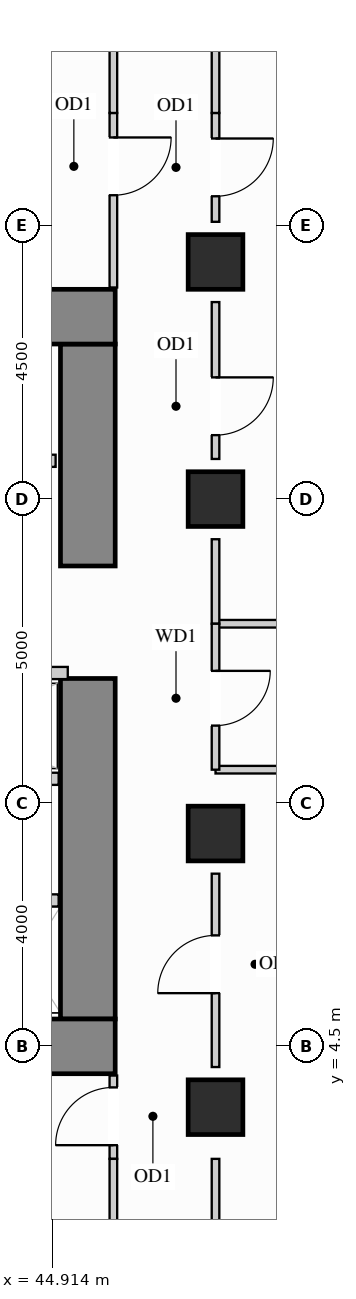
"""IFC4 building model, lengths in metres.
Left out: names, types, materials, properties, quantities, classifications, styles, units other than length and angle.
Written with IfcOpenShell. Run it as: python <this file> out.ifc"""

import sys

from ifc_helpers import new_model, si_unit, direction, frame, frame_2d, origin, origin_2d, place, context, subcontext, project, spatial, rectangle, extrude, source, transform, mapped, element, fill, save


model = new_model("IFC4")
c1 = context("Model", 3, precision=1e-05, world=origin(), true_north=direction((0.0, 1.0)))
c2 = subcontext(c1, "Body", "Model", "MODEL_VIEW")
j1 = project(units=[si_unit("LENGTHUNIT", "METRE"), si_unit("PLANEANGLEUNIT", "RADIAN")], contexts=[c1])
p1 = place(None, origin())
s1 = spatial("IfcSite", under=j1, at=p1, CompositionType="ELEMENT")
p2 = place(p1, origin())
s2 = spatial("IfcBuilding", under=s1, at=p2, CompositionType="ELEMENT")
p3 = place(p2, frame((0.0, 0.0, 51.3)))
s3 = spatial("IfcBuildingStorey", under=s2, at=p3, CompositionType="ELEMENT", Elevation=51.3)
m1 = source(origin(), c2, "Body", "SweptSolid", [
    extrude(rectangle(XDim=0.9, YDim=0.9, at=origin_2d()), origin(), (0.0, 0.0, 1.0), 3.38),
])
for number, where, z_axis, x_axis in (
    (1, (47.6, 13.5, 0.0), (0.0, 0.0, 1.0), (1.0, 0.0, 0.0)),
    (2, (47.6, 3.5, 0.0), (0.0, 0.0, 1.0), (1.0, 0.0, 0.0)),
    (3, (47.6, 8.0, 0.0), (0.0, 0.0, 1.0), (1.0, 0.0, 0.0)),
    (4, (47.6, 17.4, 0.0), (0.0, 0.0, 1.0), (1.0, 0.0, 0.0)),
):
    element("IfcColumn", number, at=place(p3, frame(where, z_axis=z_axis, x_axis=x_axis)), inside=s3, PredefinedType="COLUMN", context=c2, shape_type="MappedRepresentation", body=[
        mapped(m1, transform((0.0, 0.0, 0.0), x_axis=(1.0, 0.0, 0.0), y_axis=(0.0, 1.0, 0.0), z_axis=(0.0, 0.0, 1.0))),
    ])
m2 = source(origin(), c2, "Body", "SweptSolid", [
    extrude(rectangle(XDim=5.6, YDim=0.9, at=frame_2d((2.8, 0.0))), origin(), (0.0, 0.0, 1.0), 3.38),
])
p4 = place(p3, frame((45.5, 4.95, 0.0), z_axis=(0.0, 0.0, 1.0), x_axis=(0.0, 1.0, 0.0)))
e5 = element("IfcWall", 5, at=p4, inside=s3, PredefinedType="SHEAR", context=c2, shape_type="MappedRepresentation", body=[
    mapped(m2, transform((0.0, 0.0, 0.0), x_axis=(1.0, 0.0, 0.0), y_axis=(0.0, 1.0, 0.0), z_axis=(0.0, 0.0, 1.0))),
])
m3 = source(origin(), c2, "Body", "SweptSolid", [
    extrude(rectangle(XDim=3.65, YDim=0.9, at=frame_2d((1.825, 0.0))), origin(), (0.0, 0.0, 1.0), 3.38),
])
p5 = place(p3, frame((45.5, 12.4, 0.0), z_axis=(0.0, 0.0, 1.0), x_axis=(0.0, 1.0, 0.0)))
e6 = element("IfcWall", 6, at=p5, inside=s3, PredefinedType="SHEAR", context=c2, shape_type="MappedRepresentation", body=[
    mapped(m3, transform((0.0, 0.0, 0.0), x_axis=(1.0, 0.0, 0.0), y_axis=(0.0, 1.0, 0.0), z_axis=(0.0, 0.0, 1.0))),
])
m4 = source(origin(), c2, "Body", "SweptSolid", [
    extrude(rectangle(XDim=10.4, YDim=0.9, at=frame_2d((5.2, 0.0))), origin(), (0.0, 0.0, 1.0), 3.38),
])
for number, where, z_axis, x_axis in (
    (7, (35.55, 16.5, 0.0), (0.0, 0.0, 1.0), (1.0, 0.0, 0.0)),
    (8, (35.55, 4.5, 0.0), (0.0, 0.0, 1.0), (1.0, 0.0, 0.0)),
):
    element("IfcWall", number, at=place(p3, frame(where, z_axis=z_axis, x_axis=x_axis)), inside=s3, PredefinedType="SHEAR", context=c2, shape_type="MappedRepresentation", body=[
        mapped(m4, transform((0.0, 0.0, 0.0), x_axis=(1.0, 0.0, 0.0), y_axis=(0.0, 1.0, 0.0), z_axis=(0.0, 0.0, 1.0))),
    ])
m5 = source(origin(), c2, "Body", "SweptSolid", [
    extrude(rectangle(XDim=11.048, YDim=0.125, at=frame_2d((5.524, 0.0))), origin(), (0.0, 0.0, 1.0), 3.365),
])
for number, where, z_axis, x_axis in (
    (9, (47.6, 11.45, 0.0), (0.0, 0.0, 1.0), (1.0, 0.0, 0.0)),
    (10, (47.6, 9.05, 0.0), (0.0, 0.0, 1.0), (1.0, 0.0, 0.0)),
):
    element("IfcWall", number, at=place(p3, frame(where, z_axis=z_axis, x_axis=x_axis)), inside=s3, PredefinedType="PARTITIONING", context=c2, shape_type="MappedRepresentation", body=[
        mapped(m5, transform((0.0, 0.0, 0.0), x_axis=(1.0, 0.0, 0.0), y_axis=(0.0, 1.0, 0.0), z_axis=(0.0, 0.0, 1.0))),
    ])
p6 = place(p3, frame((47.6, 4.16, 0.0), z_axis=(0.0, 0.0, 1.0), x_axis=(0.0, 1.0, 0.0)))
e11 = element("IfcWall", 11, at=p6, inside=s3, PredefinedType="PARTITIONING", context=c2, shape_type="SweptSolid", body=[
    extrude(rectangle(XDim=3.18, YDim=0.125, at=frame_2d((1.59, 0.0))), origin(), (0.0, 0.0, 1.0), 2.67),
])
p7 = place(p6, frame((1.215, 0.0, 0.0)))
e12 = element("IfcOpeningElement", 12, at=p7, cuts=e11, PredefinedType="OPENING", context=c2, shape_type="SweptSolid", body=[
    extrude(rectangle(XDim=0.95, YDim=2.15, at=frame_2d((0.475, 1.075))), frame((0.0, 0.073, 0.0), z_axis=(0.0, -1.0, 0.0), x_axis=(1.0, 0.0, 0.0)), (0.0, 0.0, 1.0), 0.145),
])
m6 = source(origin(), c2, "Body", "SweptSolid", [
    extrude(rectangle(XDim=1.39, YDim=0.125, at=frame_2d((0.695, 0.0))), origin(), (0.0, 0.0, 1.0), 2.67),
])
p8 = place(p3, frame((47.6, 1.26, 0.0), z_axis=(0.0, 0.0, 1.0), x_axis=(0.0, 1.0, 0.0)))
e13 = element("IfcWall", 13, at=p8, inside=s3, PredefinedType="PARTITIONING", context=c2, shape_type="MappedRepresentation", body=[
    mapped(m6, transform((0.0, 0.0, 0.0), x_axis=(1.0, 0.0, 0.0), y_axis=(0.0, 1.0, 0.0), z_axis=(0.0, 0.0, 1.0))),
])
m7 = source(origin(), c2, "Body", "SweptSolid", [
    extrude(rectangle(XDim=1.39, YDim=0.125, at=frame_2d((0.695, 0.0))), origin(), (0.0, 0.0, 1.0), 2.67),
])
p9 = place(p3, frame((47.6, 11.45, 0.0), z_axis=(0.0, 0.0, 1.0), x_axis=(0.0, 1.0, 0.0)))
e14 = element("IfcWall", 14, at=p9, inside=s3, PredefinedType="PARTITIONING", context=c2, shape_type="MappedRepresentation", body=[
    mapped(m7, transform((0.0, 0.0, 0.0), x_axis=(1.0, 0.0, 0.0), y_axis=(0.0, 1.0, 0.0), z_axis=(0.0, 0.0, 1.0))),
])
p10 = place(p3, frame((47.6, 14.16, 0.0), z_axis=(0.0, 0.0, 1.0), x_axis=(0.0, 1.0, 0.0)))
e15 = element("IfcWall", 15, at=p10, inside=s3, PredefinedType="PARTITIONING", context=c2, shape_type="SweptSolid", body=[
    extrude(rectangle(XDim=2.58, YDim=0.125, at=frame_2d((1.29, 0.0))), origin(), (0.0, 0.0, 1.0), 2.67),
])
p11 = place(p10, frame((0.392, 0.0, 0.0)))
e16 = element("IfcOpeningElement", 16, at=p11, cuts=e15, PredefinedType="OPENING", context=c2, shape_type="SweptSolid", body=[
    extrude(rectangle(XDim=0.95, YDim=2.15, at=frame_2d((0.475, 1.075))), frame((0.0, 0.073, 0.0), z_axis=(0.0, -1.0, 0.0), x_axis=(1.0, 0.0, 0.0)), (0.0, 0.0, 1.0), 0.145),
])
p12 = place(p3, frame((47.6, 18.06, 0.0), z_axis=(0.0, 0.0, 1.0), x_axis=(0.0, 1.0, 0.0)))
e17 = element("IfcWall", 17, at=p12, inside=s3, PredefinedType="PARTITIONING", context=c2, shape_type="SweptSolid", body=[
    extrude(rectangle(XDim=1.79, YDim=0.125, at=frame_2d((0.895, 0.0))), origin(), (0.0, 0.0, 1.0), 2.67),
])
p13 = place(p12, frame((0.42, 0.0, 0.0)))
e18 = element("IfcOpeningElement", 18, at=p13, cuts=e17, PredefinedType="OPENING", context=c2, shape_type="SweptSolid", body=[
    extrude(rectangle(XDim=0.95, YDim=2.15, at=frame_2d((0.475, 1.075))), frame((0.0, 0.073, 0.0), z_axis=(0.0, -1.0, 0.0), x_axis=(1.0, 0.0, 0.0)), (0.0, 0.0, 1.0), 0.145),
])
p14 = place(p3, frame((47.6, 19.85, 0.0), z_axis=(0.0, 0.0, 1.0), x_axis=(0.0, 1.0, 0.0)))
e19 = element("IfcWall", 19, at=p14, inside=s3, PredefinedType="PARTITIONING", context=c2, shape_type="MappedRepresentation", body=[
    mapped(m6, transform((0.0, 0.0, 0.0), x_axis=(1.0, 0.0, 0.0), y_axis=(0.0, 1.0, 0.0), z_axis=(0.0, 0.0, 1.0))),
])
p15 = place(p3, frame((47.6, 9.05, 0.0), z_axis=(0.0, 0.0, 1.0), x_axis=(0.0, 1.0, 0.0)))
e20 = element("IfcWall", 20, at=p15, inside=s3, PredefinedType="PARTITIONING", context=c2, shape_type="SweptSolid", body=[
    extrude(rectangle(XDim=2.4, YDim=0.125, at=frame_2d((1.2, 0.0))), origin(), (0.0, 0.0, 1.0), 2.67),
])
p16 = place(p15, frame((0.725, 0.0, 0.0)))
e21 = element("IfcOpeningElement", 21, at=p16, cuts=e20, PredefinedType="OPENING", context=c2, shape_type="SweptSolid", body=[
    extrude(rectangle(XDim=0.9, YDim=2.15, at=frame_2d((0.45, 1.075))), frame((0.0, 0.073, 0.0), z_axis=(0.0, -1.0, 0.0), x_axis=(1.0, 0.0, 0.0)), (0.0, 0.0, 1.0), 0.145),
])
p17 = place(p3, frame((45.92, 16.98, 0.0), z_axis=(0.0, 0.0, 1.0), x_axis=(0.0, 1.0, 0.0)))
e22 = element("IfcWall", 22, at=p17, inside=s3, PredefinedType="PARTITIONING", context=c2, shape_type="SweptSolid", body=[
    extrude(rectangle(XDim=2.87, YDim=0.125, at=frame_2d((1.435, 0.0))), origin(), (0.0, 0.0, 1.0), 3.365),
])
p18 = place(p17, frame((1.517, 0.0, 0.0)))
e23 = element("IfcOpeningElement", 23, at=p18, cuts=e22, PredefinedType="OPENING", context=c2, shape_type="SweptSolid", body=[
    extrude(rectangle(XDim=0.95, YDim=2.15, at=frame_2d((0.475, 1.075))), frame((0.0, 0.073, 0.0), z_axis=(0.0, -1.0, 0.0), x_axis=(1.0, 0.0, 0.0)), (0.0, 0.0, 1.0), 0.145),
])
m8 = source(origin(), c2, "Body", "SweptSolid", [
    extrude(rectangle(XDim=2.298, YDim=0.125, at=frame_2d((1.149, 0.0))), origin(), (0.0, 0.0, 1.0), 3.365),
])
p19 = place(p3, frame((45.92, 19.85, 0.0), z_axis=(0.0, 0.0, 1.0), x_axis=(0.0, 1.0, 0.0)))
e24 = element("IfcWall", 24, at=p19, inside=s3, PredefinedType="PARTITIONING", context=c2, shape_type="MappedRepresentation", body=[
    mapped(m8, transform((0.0, 0.0, 0.0), x_axis=(1.0, 0.0, 0.0), y_axis=(0.0, 1.0, 0.0), z_axis=(0.0, 0.0, 1.0))),
])
p20 = place(p3, frame((45.92, 2.65, 0.0), z_axis=(0.0, 0.0, 1.0), x_axis=(0.0, 1.0, 0.0)))
e25 = element("IfcWall", 25, at=p20, inside=s3, PredefinedType="PARTITIONING", context=c2, shape_type="SweptSolid", body=[
    extrude(rectangle(XDim=1.37, YDim=0.125, at=frame_2d((0.685, 0.0))), origin(), (0.0, 0.0, 1.0), 3.365),
])
p21 = place(p20, frame((0.225, 0.0, 0.0)))
e26 = element("IfcOpeningElement", 26, at=p21, cuts=e25, PredefinedType="OPENING", context=c2, shape_type="SweptSolid", body=[
    extrude(rectangle(XDim=0.95, YDim=2.15, at=frame_2d((0.475, 1.075))), frame((0.0, 0.073, 0.0), z_axis=(0.0, -1.0, 0.0), x_axis=(1.0, 0.0, 0.0)), (0.0, 0.0, 1.0), 0.145),
])
p22 = place(p3, frame((45.92, 0.352, 0.0), z_axis=(0.0, 0.0, 1.0), x_axis=(0.0, 1.0, 0.0)))
e27 = element("IfcWall", 27, at=p22, inside=s3, PredefinedType="PARTITIONING", context=c2, shape_type="MappedRepresentation", body=[
    mapped(m8, transform((0.0, 0.0, 0.0), x_axis=(1.0, 0.0, 0.0), y_axis=(0.0, 1.0, 0.0), z_axis=(0.0, 0.0, 1.0))),
])
m9 = source(origin(), c2, "Body", "SweptSolid", [
    extrude(rectangle(XDim=1.17, YDim=0.2, at=frame_2d((0.585, 0.0))), origin(), (0.0, 0.0, 1.0), 3.365),
])
p23 = place(p3, frame((43.85, 6.9, 0.0), z_axis=(0.0, 0.0, 1.0), x_axis=(1.0, 0.0, 0.0)))
e28 = element("IfcWall", 28, at=p23, inside=s3, PredefinedType="PARTITIONING", context=c2, shape_type="MappedRepresentation", body=[
    mapped(m9, transform((0.0, 0.0, 0.0), x_axis=(1.0, 0.0, 0.0), y_axis=(0.0, 1.0, 0.0), z_axis=(0.0, 0.0, 1.0))),
])
p24 = place(p3, frame((42.23, 14.13, 0.0), z_axis=(0.0, 0.0, 1.0), x_axis=(1.0, 0.0, 0.0)))
e29 = element("IfcWall", 29, at=p24, inside=s3, PredefinedType="PARTITIONING", context=c2, shape_type="SweptSolid", body=[
    extrude(rectangle(XDim=2.74, YDim=0.2, at=frame_2d((1.37, 0.0))), origin(), (0.0, 0.0, 1.0), 3.365),
])
p25 = place(p24, frame((0.82, 0.0, 0.0)))
e30 = element("IfcOpeningElement", 30, at=p25, cuts=e29, PredefinedType="OPENING", context=c2, shape_type="SweptSolid", body=[
    extrude(rectangle(XDim=1.1, YDim=2.2, at=frame_2d((0.55, 1.1))), frame((0.0, 0.11, 0.0), z_axis=(0.0, -1.0, 0.0), x_axis=(1.0, 0.0, 0.0)), (0.0, 0.0, 1.0), 0.22),
])
m10 = source(origin(), c2, "Body", "SweptSolid", [
    extrude(rectangle(XDim=3.49, YDim=0.2, at=frame_2d((1.745, 0.0))), origin(), (0.0, 0.0, 1.0), 3.365),
])
p26 = place(p3, frame((41.68, 10.64, 0.0), z_axis=(0.0, 0.0, 1.0), x_axis=(1.0, 0.0, 0.0)))
e31 = element("IfcWall", 31, at=p26, inside=s3, PredefinedType="PARTITIONING", context=c2, shape_type="MappedRepresentation", body=[
    mapped(m10, transform((0.0, 0.0, 0.0), x_axis=(1.0, 0.0, 0.0), y_axis=(0.0, 1.0, 0.0), z_axis=(0.0, 0.0, 1.0))),
])
m11 = source(origin(), c2, "Body", "SweptSolid", [
    extrude(rectangle(XDim=3.34, YDim=0.2, at=frame_2d((1.67, 0.0))), origin(), (0.0, 0.0, 1.0), 3.365),
])
p27 = place(p3, frame((41.68, 8.9, 0.0), z_axis=(0.0, 0.0, 1.0), x_axis=(1.0, 0.0, 0.0)))
e32 = element("IfcWall", 32, at=p27, inside=s3, PredefinedType="PARTITIONING", context=c2, shape_type="MappedRepresentation", body=[
    mapped(m11, transform((0.0, 0.0, 0.0), x_axis=(1.0, 0.0, 0.0), y_axis=(0.0, 1.0, 0.0), z_axis=(0.0, 0.0, 1.0))),
])
m12 = source(origin(), c2, "Body", "SweptSolid", [
    extrude(rectangle(XDim=0.95, YDim=2.15, at=frame_2d((0.475, 1.075))), frame((0.0, 0.025, 0.0), z_axis=(0.0, -1.0, 0.0), x_axis=(1.0, 0.0, 0.0)), (0.0, 0.0, 1.0), 0.05),
])
p28 = place(p18, origin())
e33 = element("IfcDoor", 33, at=p28, inside=s3, OperationType="SINGLE_SWING_RIGHT", PredefinedType="DOOR", context=c2, shape_type="MappedRepresentation", body=[
    mapped(m12, transform((0.0, 0.0, 0.0), x_axis=(1.0, 0.0, 0.0), y_axis=(0.0, 1.0, 0.0), z_axis=(0.0, 0.0, 1.0))),
])
fill(e23, e33)
p29 = place(p21, origin())
e34 = element("IfcDoor", 34, at=p29, inside=s3, OperationType="SINGLE_SWING_LEFT", PredefinedType="DOOR", context=c2, shape_type="MappedRepresentation", body=[
    mapped(m12, transform((0.0, 0.0, 0.0), x_axis=(1.0, 0.0, 0.0), y_axis=(0.0, 1.0, 0.0), z_axis=(0.0, 0.0, 1.0))),
])
fill(e26, e34)
p30 = place(p7, origin())
e35 = element("IfcDoor", 35, at=p30, inside=s3, OperationType="SINGLE_SWING_LEFT", PredefinedType="DOOR", context=c2, shape_type="MappedRepresentation", body=[
    mapped(m12, transform((0.0, 0.0, 0.0), x_axis=(1.0, 0.0, 0.0), y_axis=(0.0, 1.0, 0.0), z_axis=(0.0, 0.0, 1.0))),
])
fill(e12, e35)
p31 = place(p11, origin())
e36 = element("IfcDoor", 36, at=p31, inside=s3, OperationType="SINGLE_SWING_RIGHT", PredefinedType="DOOR", context=c2, shape_type="MappedRepresentation", body=[
    mapped(m12, transform((0.0, 0.0, 0.0), x_axis=(1.0, 0.0, 0.0), y_axis=(0.0, 1.0, 0.0), z_axis=(0.0, 0.0, 1.0))),
])
fill(e16, e36)
p32 = place(p13, origin())
e37 = element("IfcDoor", 37, at=p32, inside=s3, OperationType="SINGLE_SWING_RIGHT", PredefinedType="DOOR", context=c2, shape_type="MappedRepresentation", body=[
    mapped(m12, transform((0.0, 0.0, 0.0), x_axis=(1.0, 0.0, 0.0), y_axis=(0.0, 1.0, 0.0), z_axis=(0.0, 0.0, 1.0))),
])
fill(e18, e37)
m13 = source(origin(), c2, "Body", "SweptSolid", [
    extrude(rectangle(XDim=0.9, YDim=2.15, at=frame_2d((0.45, 1.075))), frame((0.0, 0.025, 0.0), z_axis=(0.0, -1.0, 0.0), x_axis=(1.0, 0.0, 0.0)), (0.0, 0.0, 1.0), 0.05),
])
p33 = place(p16, origin())
e38 = element("IfcDoor", 38, at=p33, inside=s3, OperationType="SINGLE_SWING_RIGHT", PredefinedType="DOOR", context=c2, shape_type="MappedRepresentation", body=[
    mapped(m13, transform((0.0, 0.0, 0.0), x_axis=(1.0, 0.0, 0.0), y_axis=(0.0, 1.0, 0.0), z_axis=(0.0, 0.0, 1.0))),
])
fill(e21, e38)
save(model, sys.argv[1])
